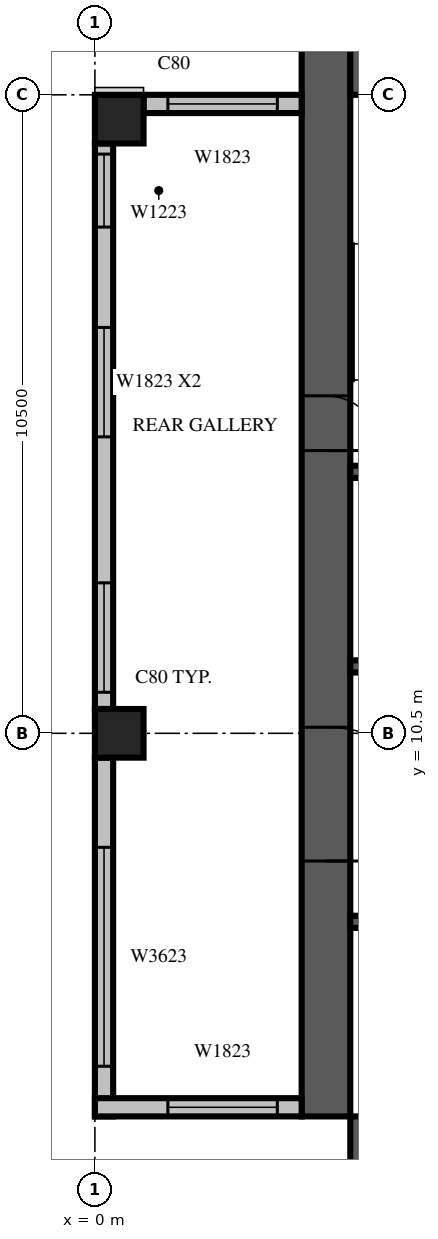
"""IFC4 building model, lengths in metres.
Left out: names, types, materials, properties, quantities, classifications, styles, units other than length and angle.
Written with IfcOpenShell. Run it as: python <this file> out.ifc"""

import sys

from ifc_helpers import new_model, si_unit, direction, frame, frame_2d, origin, origin_2d, place, context, subcontext, project, spatial, rectangle, extrude, source, transform, mapped, element, fill, save


model = new_model("IFC4")
c1 = context("Model", 3, precision=1e-05, world=origin(), true_north=direction((0.0, 1.0)))
c2 = subcontext(c1, "Body", "Model", "MODEL_VIEW")
j1 = project(units=[si_unit("LENGTHUNIT", "METRE"), si_unit("PLANEANGLEUNIT", "RADIAN")], contexts=[c1])
p1 = place(None, origin())
s1 = spatial("IfcSite", under=j1, at=p1, CompositionType="ELEMENT")
p2 = place(p1, origin())
s2 = spatial("IfcBuilding", under=s1, at=p2, CompositionType="ELEMENT")
p3 = place(p2, frame((0.0, 0.0, 234.8)))
s3 = spatial("IfcBuildingStorey", under=s2, at=p3, CompositionType="ELEMENT", Elevation=234.8)
m1 = source(origin(), c2, "Body", "SweptSolid", [
    extrude(rectangle(XDim=0.8, YDim=0.8, at=origin_2d()), origin(), (0.0, 0.0, 1.0), 3.8),
])
for number, where, z_axis, x_axis in (
    (1, (0.4, 10.5, 0.0), (0.0, 0.0, 1.0), (1.0, 0.0, 0.0)),
    (2, (0.4, 20.6, 0.0), (0.0, 0.0, 1.0), (1.0, 0.0, 0.0)),
):
    element("IfcColumn", number, at=place(p3, frame(where, z_axis=z_axis, x_axis=x_axis)), inside=s3, PredefinedType="COLUMN", context=c2, shape_type="MappedRepresentation", body=[
        mapped(m1, transform((0.0, 0.0, 0.0), scale=1.0)),
    ])
m2 = source(origin(), c2, "Body", "SweptSolid", [
    extrude(rectangle(XDim=17.6, YDim=0.8, at=frame_2d((8.8, 0.0))), origin(), (0.0, 0.0, 1.0), 3.8),
])
p4 = place(p3, frame((3.8, 4.2, 0.0), z_axis=(0.0, 0.0, 1.0), x_axis=(0.0, 1.0, 0.0)))
e3 = element("IfcWall", 3, at=p4, inside=s3, PredefinedType="SHEAR", context=c2, shape_type="MappedRepresentation", body=[
    mapped(m2, transform((0.0, 0.0, 0.0), scale=1.0)),
])
m3 = source(origin(), c2, "Body", "SweptSolid", [
    extrude(rectangle(XDim=2.2, YDim=2.1, at=frame_2d((1.1, 1.05))), frame((0.0, 0.41, 0.0), z_axis=(0.0, -1.0, 0.0), x_axis=(1.0, 0.0, 0.0)), (0.0, 0.0, 1.0), 0.82),
])
p5 = place(p4, frame((4.2, 0.0, 0.0)))
e4 = element("IfcOpeningElement", 4, at=p5, cuts=e3, PredefinedType="OPENING", context=c2, shape_type="MappedRepresentation", body=[
    mapped(m3, transform((0.0, 0.0, 0.0), scale=1.0)),
])
m4 = source(origin(), c2, "Body", "SweptSolid", [
    extrude(rectangle(XDim=0.9, YDim=2.1, at=frame_2d((0.45, 1.05))), frame((0.0, 0.41, 0.0), z_axis=(0.0, -1.0, 0.0), x_axis=(1.0, 0.0, 0.0)), (0.0, 0.0, 1.0), 0.82),
])
p6 = place(p4, frame((10.95, 0.0, 0.0)))
e5 = element("IfcOpeningElement", 5, at=p6, cuts=e3, PredefinedType="OPENING", context=c2, shape_type="MappedRepresentation", body=[
    mapped(m4, transform((0.0, 0.0, 0.0), scale=1.0)),
])
p7 = place(p3, frame((4.2, 3.8, 0.0), z_axis=(0.0, 0.0, 1.0), x_axis=(1.0, 0.0, 0.0)))
e6 = element("IfcWall", 6, at=p7, inside=s3, PredefinedType="SHEAR", context=c2, shape_type="MappedRepresentation", body=[
    mapped(m2, transform((0.0, 0.0, 0.0), scale=1.0)),
])
p8 = place(p7, frame((11.55, 0.0, 0.0)))
e7 = element("IfcOpeningElement", 7, at=p8, cuts=e6, PredefinedType="OPENING", context=c2, shape_type="MappedRepresentation", body=[
    mapped(m4, transform((0.0, 0.0, 0.0), scale=1.0)),
])
m5 = source(origin(), c2, "Body", "SweptSolid", [
    extrude(rectangle(XDim=16.8, YDim=0.8, at=frame_2d((8.4, 0.0))), origin(), (0.0, 0.0, 1.0), 3.8),
])
p9 = place(p3, frame((4.2, 21.4, 0.0), z_axis=(0.0, 0.0, 1.0), x_axis=(1.0, 0.0, 0.0)))
e8 = element("IfcWall", 8, at=p9, inside=s3, PredefinedType="SHEAR", context=c2, shape_type="MappedRepresentation", body=[
    mapped(m5, transform((0.0, 0.0, 0.0), scale=1.0)),
])
m6 = source(origin(), c2, "Body", "SweptSolid", [
    extrude(rectangle(XDim=1.2, YDim=2.1, at=frame_2d((0.6, 1.05))), frame((0.0, 0.41, 0.0), z_axis=(0.0, -1.0, 0.0), x_axis=(1.0, 0.0, 0.0)), (0.0, 0.0, 1.0), 0.82),
])
p10 = place(p9, frame((7.4, 0.0, 0.0)))
e9 = element("IfcOpeningElement", 9, at=p10, cuts=e8, PredefinedType="OPENING", context=c2, shape_type="MappedRepresentation", body=[
    mapped(m6, transform((0.0, 0.0, 0.0), scale=1.0)),
])
m7 = source(origin(), c2, "Body", "SweptSolid", [
    extrude(rectangle(XDim=2.6, YDim=0.3, at=frame_2d((1.3, 0.0))), origin(), (0.0, 0.0, 1.0), 3.4),
])
p11 = place(p3, frame((3.4, 20.85, 0.0), z_axis=(0.0, 0.0, 1.0), x_axis=(-1.0, 0.0, 0.0)))
e10 = element("IfcWall", 10, at=p11, inside=s3, PredefinedType="STANDARD", context=c2, shape_type="MappedRepresentation", body=[
    mapped(m7, transform((0.0, 0.0, 0.0), scale=1.0)),
])
m8 = source(origin(), c2, "Body", "SweptSolid", [
    extrude(rectangle(XDim=1.8, YDim=2.3, at=frame_2d((0.9, 1.15))), frame((0.0, 0.16, 0.0), z_axis=(0.0, -1.0, 0.0), x_axis=(1.0, 0.0, 0.0)), (0.0, 0.0, 1.0), 0.32),
])
p12 = place(p11, frame((0.4, 0.0, 0.6)))
e11 = element("IfcOpeningElement", 11, at=p12, cuts=e10, PredefinedType="OPENING", context=c2, shape_type="MappedRepresentation", body=[
    mapped(m8, transform((0.0, 0.0, 0.0), scale=1.0)),
])
m9 = source(origin(), c2, "Body", "SweptSolid", [
    extrude(rectangle(XDim=9.3, YDim=0.3, at=frame_2d((4.65, 0.0))), origin(), (0.0, 0.0, 1.0), 3.4),
])
p13 = place(p3, frame((0.15, 20.2, 0.0), z_axis=(0.0, 0.0, 1.0), x_axis=(0.0, -1.0, 0.0)))
e12 = element("IfcWall", 12, at=p13, inside=s3, PredefinedType="STANDARD", context=c2, shape_type="MappedRepresentation", body=[
    mapped(m9, transform((0.0, 0.0, 0.0), scale=1.0)),
])
m10 = source(origin(), c2, "Body", "SweptSolid", [
    extrude(rectangle(XDim=1.2, YDim=2.3, at=frame_2d((0.6, 1.15))), frame((0.0, 0.16, 0.0), z_axis=(0.0, -1.0, 0.0), x_axis=(1.0, 0.0, 0.0)), (0.0, 0.0, 1.0), 0.32),
])
p14 = place(p13, frame((0.175, 0.0, 0.6)))
e13 = element("IfcOpeningElement", 13, at=p14, cuts=e12, PredefinedType="OPENING", context=c2, shape_type="MappedRepresentation", body=[
    mapped(m10, transform((0.0, 0.0, 0.0), scale=1.0)),
])
p15 = place(p13, frame((3.025, 0.0, 0.6)))
e14 = element("IfcOpeningElement", 14, at=p15, cuts=e12, PredefinedType="OPENING", context=c2, shape_type="MappedRepresentation", body=[
    mapped(m8, transform((0.0, 0.0, 0.0), scale=1.0)),
])
p16 = place(p13, frame((7.225, 0.0, 0.6)))
e15 = element("IfcOpeningElement", 15, at=p16, cuts=e12, PredefinedType="OPENING", context=c2, shape_type="MappedRepresentation", body=[
    mapped(m8, transform((0.0, 0.0, 0.0), scale=1.0)),
])
m11 = source(origin(), c2, "Body", "SweptSolid", [
    extrude(rectangle(XDim=5.9, YDim=0.3, at=frame_2d((2.95, 0.0))), origin(), (0.0, 0.0, 1.0), 3.4),
])
p17 = place(p3, frame((0.15, 10.1, 0.0), z_axis=(0.0, 0.0, 1.0), x_axis=(0.0, -1.0, 0.0)))
e16 = element("IfcWall", 16, at=p17, inside=s3, PredefinedType="STANDARD", context=c2, shape_type="MappedRepresentation", body=[
    mapped(m11, transform((0.0, 0.0, 0.0), scale=1.0)),
])
m12 = source(origin(), c2, "Body", "SweptSolid", [
    extrude(rectangle(XDim=3.6, YDim=2.3, at=frame_2d((1.8, 1.15))), frame((0.0, 0.16, 0.0), z_axis=(0.0, -1.0, 0.0), x_axis=(1.0, 0.0, 0.0)), (0.0, 0.0, 1.0), 0.32),
])
p18 = place(p17, frame((1.475, 0.0, 0.6)))
e17 = element("IfcOpeningElement", 17, at=p18, cuts=e16, PredefinedType="OPENING", context=c2, shape_type="MappedRepresentation", body=[
    mapped(m12, transform((0.0, 0.0, 0.0), scale=1.0)),
])
m13 = source(origin(), c2, "Body", "SweptSolid", [
    extrude(rectangle(XDim=3.4, YDim=0.3, at=frame_2d((1.7, 0.0))), origin(), (0.0, 0.0, 1.0), 3.4),
])
p19 = place(p3, frame((0.0, 4.35, 0.0), z_axis=(0.0, 0.0, 1.0), x_axis=(1.0, 0.0, 0.0)))
e18 = element("IfcWall", 18, at=p19, inside=s3, PredefinedType="STANDARD", context=c2, shape_type="MappedRepresentation", body=[
    mapped(m13, transform((0.0, 0.0, 0.0), scale=1.0)),
])
p20 = place(p19, frame((1.2, 0.0, 0.6)))
e19 = element("IfcOpeningElement", 19, at=p20, cuts=e18, PredefinedType="OPENING", context=c2, shape_type="MappedRepresentation", body=[
    mapped(m8, transform((0.0, 0.0, 0.0), scale=1.0)),
])
m14 = source(origin(), c2, "Body", "SweptSolid", [
    extrude(rectangle(XDim=9.6, YDim=0.2, at=frame_2d((4.8, 0.0))), origin(), (0.0, 0.0, 1.0), 3.8),
])
p21 = place(p3, frame((4.2, 7.4, 0.0), z_axis=(0.0, 0.0, 1.0), x_axis=(1.0, 0.0, 0.0)))
e20 = element("IfcWall", 20, at=p21, inside=s3, PredefinedType="SOLIDWALL", context=c2, shape_type="MappedRepresentation", body=[
    mapped(m14, transform((0.0, 0.0, 0.0), scale=1.0)),
])
m15 = source(origin(), c2, "Body", "SweptSolid", [
    extrude(rectangle(XDim=1.1, YDim=2.1, at=frame_2d((0.55, 1.05))), frame((0.0, 0.11, 0.0), z_axis=(0.0, -1.0, 0.0), x_axis=(1.0, 0.0, 0.0)), (0.0, 0.0, 1.0), 0.22),
])
p22 = place(p21, frame((0.65, 0.0, 0.0)))
e21 = element("IfcOpeningElement", 21, at=p22, cuts=e20, PredefinedType="OPENING", context=c2, shape_type="MappedRepresentation", body=[
    mapped(m15, transform((0.0, 0.0, 0.0), scale=1.0)),
])
p23 = place(p21, frame((3.05, 0.0, 0.0)))
e22 = element("IfcOpeningElement", 22, at=p23, cuts=e20, PredefinedType="OPENING", context=c2, shape_type="MappedRepresentation", body=[
    mapped(m15, transform((0.0, 0.0, 0.0), scale=1.0)),
])
p24 = place(p21, frame((5.45, 0.0, 0.0)))
e23 = element("IfcOpeningElement", 23, at=p24, cuts=e20, PredefinedType="OPENING", context=c2, shape_type="MappedRepresentation", body=[
    mapped(m15, transform((0.0, 0.0, 0.0), scale=1.0)),
])
p25 = place(p21, frame((7.85, 0.0, 0.0)))
e24 = element("IfcOpeningElement", 24, at=p25, cuts=e20, PredefinedType="OPENING", context=c2, shape_type="MappedRepresentation", body=[
    mapped(m15, transform((0.0, 0.0, 0.0), scale=1.0)),
])
m16 = source(origin(), c2, "Body", "SweptSolid", [
    extrude(rectangle(XDim=4.8, YDim=0.2, at=frame_2d((2.4, 0.0))), origin(), (0.0, 0.0, 1.0), 3.8),
])
p26 = place(p3, frame((4.2, 11.6, 0.0), z_axis=(0.0, 0.0, 1.0), x_axis=(1.0, 0.0, 0.0)))
e25 = element("IfcWall", 25, at=p26, inside=s3, PredefinedType="SOLIDWALL", context=c2, shape_type="MappedRepresentation", body=[
    mapped(m16, transform((0.0, 0.0, 0.0), scale=1.0)),
])
p27 = place(p26, frame((0.65, 0.0, 0.0)))
e26 = element("IfcOpeningElement", 26, at=p27, cuts=e25, PredefinedType="OPENING", context=c2, shape_type="MappedRepresentation", body=[
    mapped(m15, transform((0.0, 0.0, 0.0), scale=1.0)),
])
p28 = place(p26, frame((3.05, 0.0, 0.0)))
e27 = element("IfcOpeningElement", 27, at=p28, cuts=e25, PredefinedType="OPENING", context=c2, shape_type="MappedRepresentation", body=[
    mapped(m15, transform((0.0, 0.0, 0.0), scale=1.0)),
])
p29 = place(p3, frame((4.2, 14.8, 0.0), z_axis=(0.0, 0.0, 1.0), x_axis=(1.0, 0.0, 0.0)))
e28 = element("IfcWall", 28, at=p29, inside=s3, PredefinedType="SOLIDWALL", context=c2, shape_type="MappedRepresentation", body=[
    mapped(m16, transform((0.0, 0.0, 0.0), scale=1.0)),
])
m17 = source(origin(), c2, "Body", "SweptSolid", [
    extrude(rectangle(XDim=1.8, YDim=2.3, at=frame_2d((0.9, 1.15))), frame((0.0, 0.03, 0.0), z_axis=(0.0, -1.0, 0.0), x_axis=(1.0, 0.0, 0.0)), (0.0, 0.0, 1.0), 0.06),
])
p30 = place(p12, origin())
e29 = element("IfcWindow", 29, at=p30, inside=s3, PartitioningType="SINGLE_PANEL", PredefinedType="WINDOW", context=c2, shape_type="MappedRepresentation", body=[
    mapped(m17, transform((0.0, 0.0, 0.0), scale=1.0)),
])
fill(e11, e29)
m18 = source(origin(), c2, "Body", "SweptSolid", [
    extrude(rectangle(XDim=1.2, YDim=2.3, at=frame_2d((0.6, 1.15))), frame((0.0, 0.03, 0.0), z_axis=(0.0, -1.0, 0.0), x_axis=(1.0, 0.0, 0.0)), (0.0, 0.0, 1.0), 0.06),
])
p31 = place(p14, origin())
e30 = element("IfcWindow", 30, at=p31, inside=s3, PartitioningType="SINGLE_PANEL", PredefinedType="WINDOW", context=c2, shape_type="MappedRepresentation", body=[
    mapped(m18, transform((0.0, 0.0, 0.0), scale=1.0)),
])
fill(e13, e30)
p32 = place(p15, origin())
e31 = element("IfcWindow", 31, at=p32, inside=s3, PartitioningType="SINGLE_PANEL", PredefinedType="WINDOW", context=c2, shape_type="MappedRepresentation", body=[
    mapped(m17, transform((0.0, 0.0, 0.0), scale=1.0)),
])
fill(e14, e31)
p33 = place(p16, origin())
e32 = element("IfcWindow", 32, at=p33, inside=s3, PartitioningType="SINGLE_PANEL", PredefinedType="WINDOW", context=c2, shape_type="MappedRepresentation", body=[
    mapped(m17, transform((0.0, 0.0, 0.0), scale=1.0)),
])
fill(e15, e32)
m19 = source(origin(), c2, "Body", "SweptSolid", [
    extrude(rectangle(XDim=3.6, YDim=2.3, at=frame_2d((1.8, 1.15))), frame((0.0, 0.03, 0.0), z_axis=(0.0, -1.0, 0.0), x_axis=(1.0, 0.0, 0.0)), (0.0, 0.0, 1.0), 0.06),
])
p34 = place(p18, origin())
e33 = element("IfcWindow", 33, at=p34, inside=s3, PartitioningType="SINGLE_PANEL", PredefinedType="WINDOW", context=c2, shape_type="MappedRepresentation", body=[
    mapped(m19, transform((0.0, 0.0, 0.0), scale=1.0)),
])
fill(e17, e33)
p35 = place(p20, origin())
e34 = element("IfcWindow", 34, at=p35, inside=s3, PartitioningType="SINGLE_PANEL", PredefinedType="WINDOW", context=c2, shape_type="MappedRepresentation", body=[
    mapped(m17, transform((0.0, 0.0, 0.0), scale=1.0)),
])
fill(e19, e34)
m20 = source(origin(), c2, "Body", "SweptSolid", [
    extrude(rectangle(XDim=2.2, YDim=2.1, at=frame_2d((1.1, 1.05))), frame((0.0, 0.025, 0.0), z_axis=(0.0, -1.0, 0.0), x_axis=(1.0, 0.0, 0.0)), (0.0, 0.0, 1.0), 0.05),
])
p36 = place(p5, origin())
e35 = element("IfcDoor", 35, at=p36, inside=s3, OperationType="DOUBLE_DOOR_SINGLE_SWING", PredefinedType="DOOR", context=c2, shape_type="MappedRepresentation", body=[
    mapped(m20, transform((0.0, 0.0, 0.0), scale=1.0)),
])
fill(e4, e35)
m21 = source(origin(), c2, "Body", "SweptSolid", [
    extrude(rectangle(XDim=0.9, YDim=2.1, at=frame_2d((0.45, 1.05))), frame((0.0, 0.025, 0.0), z_axis=(0.0, -1.0, 0.0), x_axis=(1.0, 0.0, 0.0)), (0.0, 0.0, 1.0), 0.05),
])
p37 = place(p6, origin())
e36 = element("IfcDoor", 36, at=p37, inside=s3, OperationType="SINGLE_SWING_RIGHT", PredefinedType="DOOR", context=c2, shape_type="MappedRepresentation", body=[
    mapped(m21, transform((0.0, 0.0, 0.0), scale=1.0)),
])
fill(e5, e36)
save(model, sys.argv[1])
